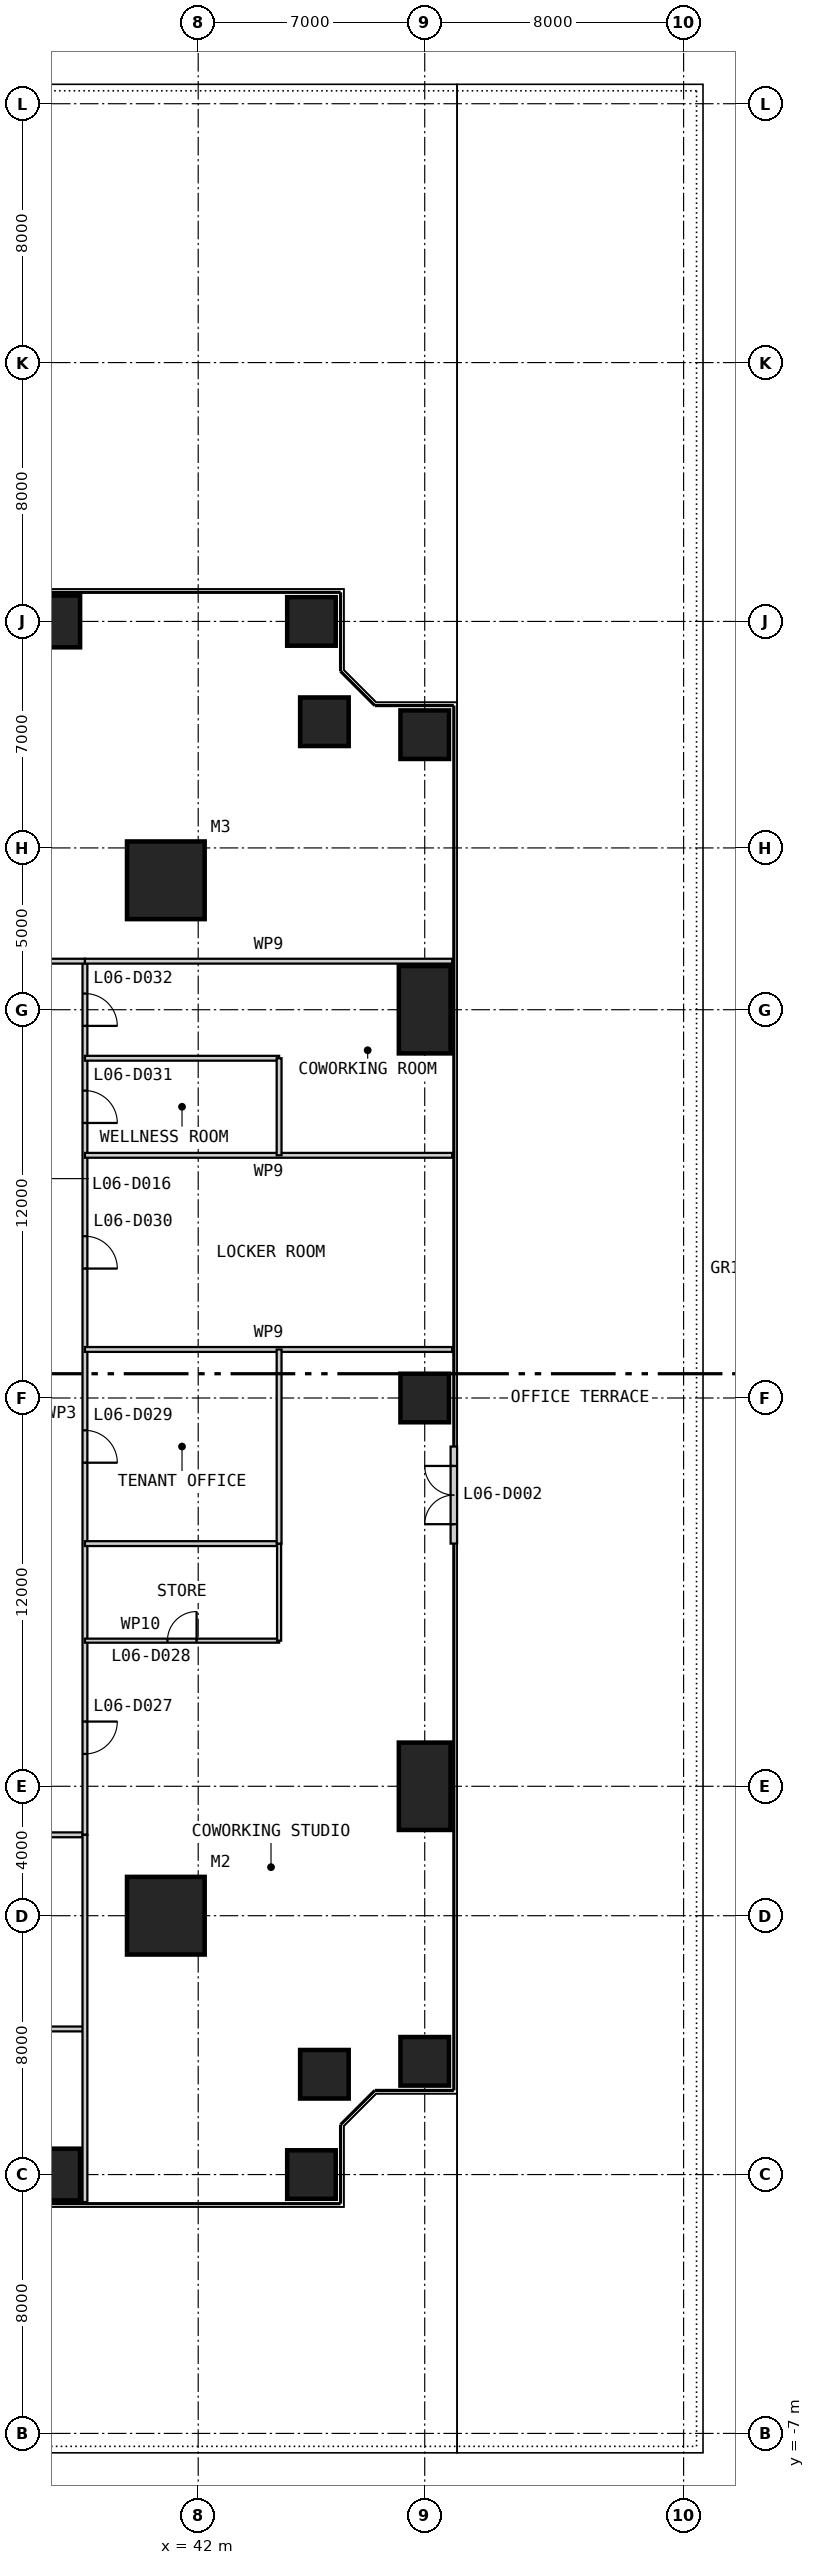
"""IFC4 building model, lengths in metres.
Left out: names, types, materials, properties, quantities, classifications, styles, units other than length and angle.
Written with IfcOpenShell. Run it as: python <this file> out.ifc"""

import sys

from ifc_helpers import new_model, si_unit, direction, frame, frame_2d, origin, origin_2d, place, context, subcontext, project, spatial, rectangle, extrude, element, fill, save


model = new_model("IFC4")
c1 = context("Model", 3, precision=1e-05, world=origin(), true_north=direction((0.0, 1.0)))
c2 = subcontext(c1, "Body", "Model", "MODEL_VIEW")
j1 = project(units=[si_unit("LENGTHUNIT", "METRE"), si_unit("PLANEANGLEUNIT", "RADIAN")], contexts=[c1])
p1 = place(None, origin())
s1 = spatial("IfcSite", under=j1, at=p1, CompositionType="ELEMENT")
p2 = place(p1, origin())
s2 = spatial("IfcBuilding", under=s1, at=p2, CompositionType="ELEMENT")
p3 = place(p2, frame((0.0, 0.0, 31.0)))
s3 = spatial("IfcBuildingStorey", under=s2, at=p3, CompositionType="ELEMENT", Elevation=31.0)
for number, where, z_axis, x_axis in (
    (1, (41.0, 9.0, 0.0), (0.0, 0.0, 1.0), (1.0, 0.0, 0.0)),
    (2, (41.0, 41.0, 0.0), (0.0, 0.0, 1.0), (1.0, 0.0, 0.0)),
):
    element("IfcColumn", number, at=place(p3, frame(where, z_axis=z_axis, x_axis=x_axis)), inside=s3, PredefinedType="COLUMN", context=c2, shape_type="SweptSolid", body=[
        extrude(rectangle(XDim=2.4, YDim=2.4, at=origin_2d()), origin(), (0.0, 0.0, 1.0), 4.0),
    ])
p4 = place(p3, frame((37.0, 1.0, 0.0), z_axis=(0.0, 0.0, 1.0), x_axis=(1.0, 0.0, 0.0)))
e3 = element("IfcColumn", 3, at=p4, inside=s3, PredefinedType="COLUMN", context=c2, shape_type="SweptSolid", body=[
    extrude(rectangle(XDim=2.7, YDim=1.6, at=origin_2d()), origin(), (0.0, 0.0, 1.0), 4.0),
])
for number, where, z_axis, x_axis in (
    (4, (45.5, 1.0, 0.0), (0.0, 0.0, 1.0), (1.0, 0.0, 0.0)),
    (5, (45.9, 4.1, 0.0), (0.0, 0.0, 1.0), (1.0, 0.0, 0.0)),
    (6, (49.0, 4.5, 0.0), (0.0, 0.0, 1.0), (1.0, 0.0, 0.0)),
):
    element("IfcColumn", number, at=place(p3, frame(where, z_axis=z_axis, x_axis=x_axis)), inside=s3, PredefinedType="COLUMN", context=c2, shape_type="SweptSolid", body=[
        extrude(rectangle(XDim=1.5, YDim=1.5, at=origin_2d()), origin(), (0.0, 0.0, 1.0), 4.0),
    ])
p5 = place(p3, frame((49.0, 13.0, 0.0), z_axis=(0.0, 0.0, 1.0), x_axis=(1.0, 0.0, 0.0)))
e7 = element("IfcColumn", 7, at=p5, inside=s3, PredefinedType="COLUMN", context=c2, shape_type="SweptSolid", body=[
    extrude(rectangle(XDim=1.6, YDim=2.7, at=origin_2d()), origin(), (0.0, 0.0, 1.0), 4.0),
])
p6 = place(p3, frame((49.0, 25.0, 0.0), z_axis=(0.0, 0.0, 1.0), x_axis=(1.0, 0.0, 0.0)))
e8 = element("IfcColumn", 8, at=p6, inside=s3, PredefinedType="COLUMN", context=c2, shape_type="SweptSolid", body=[
    extrude(rectangle(XDim=1.5, YDim=1.5, at=origin_2d()), origin(), (0.0, 0.0, 1.0), 4.0),
])
p7 = place(p3, frame((49.0, 37.0, 0.0), z_axis=(0.0, 0.0, 1.0), x_axis=(1.0, 0.0, 0.0)))
e9 = element("IfcColumn", 9, at=p7, inside=s3, PredefinedType="COLUMN", context=c2, shape_type="SweptSolid", body=[
    extrude(rectangle(XDim=1.6, YDim=2.7, at=origin_2d()), origin(), (0.0, 0.0, 1.0), 4.0),
])
for number, where, z_axis, x_axis in (
    (10, (49.0, 45.5, 0.0), (0.0, 0.0, 1.0), (1.0, 0.0, 0.0)),
    (11, (45.9, 45.9, 0.0), (0.0, 0.0, 1.0), (1.0, 0.0, 0.0)),
    (12, (45.5, 49.0, 0.0), (0.0, 0.0, 1.0), (1.0, 0.0, 0.0)),
):
    element("IfcColumn", number, at=place(p3, frame(where, z_axis=z_axis, x_axis=x_axis)), inside=s3, PredefinedType="COLUMN", context=c2, shape_type="SweptSolid", body=[
        extrude(rectangle(XDim=1.5, YDim=1.5, at=origin_2d()), origin(), (0.0, 0.0, 1.0), 4.0),
    ])
p8 = place(p3, frame((37.0, 49.0, 0.0), z_axis=(0.0, 0.0, 1.0), x_axis=(1.0, 0.0, 0.0)))
e13 = element("IfcColumn", 13, at=p8, inside=s3, PredefinedType="COLUMN", context=c2, shape_type="SweptSolid", body=[
    extrude(rectangle(XDim=2.7, YDim=1.6, at=origin_2d()), origin(), (0.0, 0.0, 1.0), 4.0),
])
p9 = place(p3, frame((49.9, 20.5, 0.0), z_axis=(0.0, 0.0, 1.0), x_axis=(0.0, 1.0, 0.0)))
e14 = element("IfcWall", 14, at=p9, inside=s3, PredefinedType="SOLIDWALL", context=c2, shape_type="SweptSolid", body=[
    extrude(rectangle(XDim=3.0, YDim=0.2, at=frame_2d((1.5, 0.0))), origin(), (0.0, 0.0, 1.0), 3.85),
])
p10 = place(p9, frame((0.6, 0.0, 0.0)))
e15 = element("IfcOpeningElement", 15, at=p10, cuts=e14, PredefinedType="OPENING", context=c2, shape_type="SweptSolid", body=[
    extrude(rectangle(XDim=1.8, YDim=2.4, at=frame_2d((0.9, 1.2))), frame((0.0, 0.11, 0.0), z_axis=(0.0, -1.0, 0.0), x_axis=(1.0, 0.0, 0.0)), (0.0, 0.0, 1.0), 0.22),
])
p11 = place(p3, frame((11.5, 11.5, 0.0), z_axis=(0.0, 0.0, 1.0), x_axis=(1.0, 0.0, 0.0)))
e16 = element("IfcWall", 16, at=p11, inside=s3, PredefinedType="PARTITIONING", context=c2, shape_type="SweptSolid", body=[
    extrude(rectangle(XDim=27.0, YDim=0.15, at=frame_2d((13.5, 0.0))), origin(), (0.0, 0.0, 1.0), 3.85),
])
p12 = place(p11, frame((5.5, 0.0, 0.0)))
e17 = element("IfcOpeningElement", 17, at=p12, cuts=e16, PredefinedType="OPENING", context=c2, shape_type="SweptSolid", body=[
    extrude(rectangle(XDim=1.0, YDim=2.2, at=frame_2d((0.5, 1.1))), frame((0.0, 0.085, 0.0), z_axis=(0.0, -1.0, 0.0), x_axis=(1.0, 0.0, 0.0)), (0.0, 0.0, 1.0), 0.17),
])
p13 = place(p11, frame((17.5, 0.0, 0.0)))
e18 = element("IfcOpeningElement", 18, at=p13, cuts=e16, PredefinedType="OPENING", context=c2, shape_type="SweptSolid", body=[
    extrude(rectangle(XDim=1.0, YDim=2.2, at=frame_2d((0.5, 1.1))), frame((0.0, 0.085, 0.0), z_axis=(0.0, -1.0, 0.0), x_axis=(1.0, 0.0, 0.0)), (0.0, 0.0, 1.0), 0.17),
])
p14 = place(p11, frame((23.5, 0.0, 0.0)))
e19 = element("IfcOpeningElement", 19, at=p14, cuts=e16, PredefinedType="OPENING", context=c2, shape_type="SweptSolid", body=[
    extrude(rectangle(XDim=1.0, YDim=2.2, at=frame_2d((0.5, 1.1))), frame((0.0, 0.085, 0.0), z_axis=(0.0, -1.0, 0.0), x_axis=(1.0, 0.0, 0.0)), (0.0, 0.0, 1.0), 0.17),
])
p15 = place(p3, frame((32.5, 5.5, 0.0), z_axis=(0.0, 0.0, 1.0), x_axis=(1.0, 0.0, 0.0)))
e20 = element("IfcWall", 20, at=p15, inside=s3, PredefinedType="PARTITIONING", context=c2, shape_type="SweptSolid", body=[
    extrude(rectangle(XDim=6.0, YDim=0.15, at=frame_2d((3.0, 0.0))), origin(), (0.0, 0.0, 1.0), 3.85),
])
p16 = place(p3, frame((38.5, 11.5, 0.0), z_axis=(0.0, 0.0, 1.0), x_axis=(0.0, 1.0, 0.0)))
e21 = element("IfcWall", 21, at=p16, inside=s3, PredefinedType="PARTITIONING", context=c2, shape_type="SweptSolid", body=[
    extrude(rectangle(XDim=27.0, YDim=0.15, at=frame_2d((13.5, 0.0))), origin(), (0.0, 0.0, 1.0), 3.85),
])
p17 = place(p16, frame((2.5, 0.0, 0.0)))
e22 = element("IfcOpeningElement", 22, at=p17, cuts=e21, PredefinedType="OPENING", context=c2, shape_type="SweptSolid", body=[
    extrude(rectangle(XDim=1.0, YDim=2.2, at=frame_2d((0.5, 1.1))), frame((0.0, 0.085, 0.0), z_axis=(0.0, -1.0, 0.0), x_axis=(1.0, 0.0, 0.0)), (0.0, 0.0, 1.0), 0.17),
])
p18 = place(p16, frame((11.5, 0.0, 0.0)))
e23 = element("IfcOpeningElement", 23, at=p18, cuts=e21, PredefinedType="OPENING", context=c2, shape_type="SweptSolid", body=[
    extrude(rectangle(XDim=1.0, YDim=2.2, at=frame_2d((0.5, 1.1))), frame((0.0, 0.085, 0.0), z_axis=(0.0, -1.0, 0.0), x_axis=(1.0, 0.0, 0.0)), (0.0, 0.0, 1.0), 0.17),
])
p19 = place(p16, frame((17.5, 0.0, 0.0)))
e24 = element("IfcOpeningElement", 24, at=p19, cuts=e21, PredefinedType="OPENING", context=c2, shape_type="SweptSolid", body=[
    extrude(rectangle(XDim=1.0, YDim=2.2, at=frame_2d((0.5, 1.1))), frame((0.0, 0.085, 0.0), z_axis=(0.0, -1.0, 0.0), x_axis=(1.0, 0.0, 0.0)), (0.0, 0.0, 1.0), 0.17),
])
p20 = place(p16, frame((22.0, 0.0, 0.0)))
e25 = element("IfcOpeningElement", 25, at=p20, cuts=e21, PredefinedType="OPENING", context=c2, shape_type="SweptSolid", body=[
    extrude(rectangle(XDim=1.0, YDim=2.2, at=frame_2d((0.5, 1.1))), frame((0.0, 0.085, 0.0), z_axis=(0.0, -1.0, 0.0), x_axis=(1.0, 0.0, 0.0)), (0.0, 0.0, 1.0), 0.17),
])
p21 = place(p16, frame((25.0, 0.0, 0.0)))
e26 = element("IfcOpeningElement", 26, at=p21, cuts=e21, PredefinedType="OPENING", context=c2, shape_type="SweptSolid", body=[
    extrude(rectangle(XDim=1.0, YDim=2.2, at=frame_2d((0.5, 1.1))), frame((0.0, 0.085, 0.0), z_axis=(0.0, -1.0, 0.0), x_axis=(1.0, 0.0, 0.0)), (0.0, 0.0, 1.0), 0.17),
])
p22 = place(p3, frame((38.5, 0.15, 0.0), z_axis=(0.0, 0.0, 1.0), x_axis=(0.0, 1.0, 0.0)))
e27 = element("IfcWall", 27, at=p22, inside=s3, PredefinedType="PARTITIONING", context=c2, shape_type="SweptSolid", body=[
    extrude(rectangle(XDim=11.35, YDim=0.15, at=frame_2d((5.675, 0.0))), origin(), (0.0, 0.0, 1.0), 3.85),
])
p23 = place(p3, frame((44.5, 17.5, 0.0), z_axis=(0.0, 0.0, 1.0), x_axis=(-1.0, 0.0, 0.0)))
e28 = element("IfcWall", 28, at=p23, inside=s3, PredefinedType="PARTITIONING", context=c2, shape_type="SweptSolid", body=[
    extrude(rectangle(XDim=6.0, YDim=0.125, at=frame_2d((3.0, 0.0))), origin(), (0.0, 0.0, 1.0), 3.85),
])
p24 = place(p23, frame((2.55, 0.0, 0.0)))
e29 = element("IfcOpeningElement", 29, at=p24, cuts=e28, PredefinedType="OPENING", context=c2, shape_type="SweptSolid", body=[
    extrude(rectangle(XDim=0.9, YDim=2.2, at=frame_2d((0.45, 1.1))), frame((0.0, 0.073, 0.0), z_axis=(0.0, -1.0, 0.0), x_axis=(1.0, 0.0, 0.0)), (0.0, 0.0, 1.0), 0.145),
])
p25 = place(p3, frame((44.5, 20.5, 0.0), z_axis=(0.0, 0.0, 1.0), x_axis=(-1.0, 0.0, 0.0)))
e30 = element("IfcWall", 30, at=p25, inside=s3, PredefinedType="PARTITIONING", context=c2, shape_type="SweptSolid", body=[
    extrude(rectangle(XDim=6.0, YDim=0.15, at=frame_2d((3.0, 0.0))), origin(), (0.0, 0.0, 1.0), 3.85),
])
for number, where, z_axis, x_axis in (
    (31, (49.85, 26.5, 0.0), (0.0, 0.0, 1.0), (-1.0, 0.0, 0.0)),
    (32, (49.85, 32.5, 0.0), (0.0, 0.0, 1.0), (-1.0, 0.0, 0.0)),
):
    element("IfcWall", number, at=place(p3, frame(where, z_axis=z_axis, x_axis=x_axis)), inside=s3, PredefinedType="PARTITIONING", context=c2, shape_type="SweptSolid", body=[
        extrude(rectangle(XDim=11.35, YDim=0.15, at=frame_2d((5.675, 0.0))), origin(), (0.0, 0.0, 1.0), 3.85),
    ])
p26 = place(p3, frame((44.5, 35.5, 0.0), z_axis=(0.0, 0.0, 1.0), x_axis=(-1.0, 0.0, 0.0)))
e33 = element("IfcWall", 33, at=p26, inside=s3, PredefinedType="PARTITIONING", context=c2, shape_type="SweptSolid", body=[
    extrude(rectangle(XDim=6.0, YDim=0.15, at=frame_2d((3.0, 0.0))), origin(), (0.0, 0.0, 1.0), 3.85),
])
p27 = place(p3, frame((44.5, 17.5, 0.0), z_axis=(0.0, 0.0, 1.0), x_axis=(0.0, 1.0, 0.0)))
e34 = element("IfcWall", 34, at=p27, inside=s3, PredefinedType="PARTITIONING", context=c2, shape_type="SweptSolid", body=[
    extrude(rectangle(XDim=3.0, YDim=0.125, at=frame_2d((1.5, 0.0))), origin(), (0.0, 0.0, 1.0), 3.85),
])
p28 = place(p3, frame((44.5, 20.5, 0.0), z_axis=(0.0, 0.0, 1.0), x_axis=(0.0, 1.0, 0.0)))
e35 = element("IfcWall", 35, at=p28, inside=s3, PredefinedType="PARTITIONING", context=c2, shape_type="SweptSolid", body=[
    extrude(rectangle(XDim=6.0, YDim=0.15, at=frame_2d((3.0, 0.0))), origin(), (0.0, 0.0, 1.0), 3.85),
])
p29 = place(p3, frame((44.5, 32.5, 0.0), z_axis=(0.0, 0.0, 1.0), x_axis=(0.0, 1.0, 0.0)))
e36 = element("IfcWall", 36, at=p29, inside=s3, PredefinedType="PARTITIONING", context=c2, shape_type="SweptSolid", body=[
    extrude(rectangle(XDim=3.0, YDim=0.15, at=frame_2d((1.5, 0.0))), origin(), (0.0, 0.0, 1.0), 3.85),
])
p30 = place(p3, frame((38.5, 38.5, 0.0), z_axis=(0.0, 0.0, 1.0), x_axis=(-1.0, 0.0, 0.0)))
e37 = element("IfcWall", 37, at=p30, inside=s3, PredefinedType="PARTITIONING", context=c2, shape_type="SweptSolid", body=[
    extrude(rectangle(XDim=27.0, YDim=0.15, at=frame_2d((13.5, 0.0))), origin(), (0.0, 0.0, 1.0), 3.85),
])
p31 = place(p30, frame((5.5, 0.0, 0.0)))
e38 = element("IfcOpeningElement", 38, at=p31, cuts=e37, PredefinedType="OPENING", context=c2, shape_type="SweptSolid", body=[
    extrude(rectangle(XDim=1.0, YDim=2.2, at=frame_2d((0.5, 1.1))), frame((0.0, 0.085, 0.0), z_axis=(0.0, -1.0, 0.0), x_axis=(1.0, 0.0, 0.0)), (0.0, 0.0, 1.0), 0.17),
])
p32 = place(p30, frame((17.5, 0.0, 0.0)))
e39 = element("IfcOpeningElement", 39, at=p32, cuts=e37, PredefinedType="OPENING", context=c2, shape_type="SweptSolid", body=[
    extrude(rectangle(XDim=1.0, YDim=2.2, at=frame_2d((0.5, 1.1))), frame((0.0, 0.085, 0.0), z_axis=(0.0, -1.0, 0.0), x_axis=(1.0, 0.0, 0.0)), (0.0, 0.0, 1.0), 0.17),
])
p33 = place(p30, frame((23.5, 0.0, 0.0)))
e40 = element("IfcOpeningElement", 40, at=p33, cuts=e37, PredefinedType="OPENING", context=c2, shape_type="SweptSolid", body=[
    extrude(rectangle(XDim=1.0, YDim=2.2, at=frame_2d((0.5, 1.1))), frame((0.0, 0.085, 0.0), z_axis=(0.0, -1.0, 0.0), x_axis=(1.0, 0.0, 0.0)), (0.0, 0.0, 1.0), 0.17),
])
p34 = place(p3, frame((49.85, 38.5, 0.0), z_axis=(0.0, 0.0, 1.0), x_axis=(-1.0, 0.0, 0.0)))
e41 = element("IfcWall", 41, at=p34, inside=s3, PredefinedType="PARTITIONING", context=c2, shape_type="SweptSolid", body=[
    extrude(rectangle(XDim=11.35, YDim=0.15, at=frame_2d((5.675, 0.0))), origin(), (0.0, 0.0, 1.0), 3.85),
])
p35 = place(p10, origin())
e42 = element("IfcDoor", 42, at=p35, inside=s3, OperationType="DOUBLE_DOOR_SINGLE_SWING", PredefinedType="DOOR", context=c2, shape_type="SweptSolid", body=[
    extrude(rectangle(XDim=1.8, YDim=2.4, at=frame_2d((0.9, 1.2))), frame((0.0, 0.025, 0.0), z_axis=(0.0, -1.0, 0.0), x_axis=(1.0, 0.0, 0.0)), (0.0, 0.0, 1.0), 0.05),
])
fill(e15, e42)
p36 = place(p17, frame((1.0, 0.0, 0.0), z_axis=(0.0, 0.0, 1.0), x_axis=(-1.0, 0.0, 0.0)))
e43 = element("IfcDoor", 43, at=p36, inside=s3, OperationType="SINGLE_SWING_LEFT", PredefinedType="DOOR", context=c2, shape_type="SweptSolid", body=[
    extrude(rectangle(XDim=1.0, YDim=2.2, at=frame_2d((0.5, 1.1))), frame((0.0, 0.025, 0.0), z_axis=(0.0, -1.0, 0.0), x_axis=(1.0, 0.0, 0.0)), (0.0, 0.0, 1.0), 0.05),
])
fill(e22, e43)
p37 = place(p24, frame((0.9, 0.0, 0.0), z_axis=(0.0, 0.0, 1.0), x_axis=(-1.0, 0.0, 0.0)))
e44 = element("IfcDoor", 44, at=p37, inside=s3, OperationType="SINGLE_SWING_RIGHT", PredefinedType="DOOR", context=c2, shape_type="SweptSolid", body=[
    extrude(rectangle(XDim=0.9, YDim=2.2, at=frame_2d((0.45, 1.1))), frame((0.0, 0.025, 0.0), z_axis=(0.0, -1.0, 0.0), x_axis=(1.0, 0.0, 0.0)), (0.0, 0.0, 1.0), 0.05),
])
fill(e29, e44)
p38 = place(p18, frame((1.0, 0.0, 0.0), z_axis=(0.0, 0.0, 1.0), x_axis=(-1.0, 0.0, 0.0)))
e45 = element("IfcDoor", 45, at=p38, inside=s3, OperationType="SINGLE_SWING_RIGHT", PredefinedType="DOOR", context=c2, shape_type="SweptSolid", body=[
    extrude(rectangle(XDim=1.0, YDim=2.2, at=frame_2d((0.5, 1.1))), frame((0.0, 0.025, 0.0), z_axis=(0.0, -1.0, 0.0), x_axis=(1.0, 0.0, 0.0)), (0.0, 0.0, 1.0), 0.05),
])
fill(e23, e45)
p39 = place(p19, frame((1.0, 0.0, 0.0), z_axis=(0.0, 0.0, 1.0), x_axis=(-1.0, 0.0, 0.0)))
e46 = element("IfcDoor", 46, at=p39, inside=s3, OperationType="SINGLE_SWING_RIGHT", PredefinedType="DOOR", context=c2, shape_type="SweptSolid", body=[
    extrude(rectangle(XDim=1.0, YDim=2.2, at=frame_2d((0.5, 1.1))), frame((0.0, 0.025, 0.0), z_axis=(0.0, -1.0, 0.0), x_axis=(1.0, 0.0, 0.0)), (0.0, 0.0, 1.0), 0.05),
])
fill(e24, e46)
p40 = place(p20, frame((1.0, 0.0, 0.0), z_axis=(0.0, 0.0, 1.0), x_axis=(-1.0, 0.0, 0.0)))
e47 = element("IfcDoor", 47, at=p40, inside=s3, OperationType="SINGLE_SWING_RIGHT", PredefinedType="DOOR", context=c2, shape_type="SweptSolid", body=[
    extrude(rectangle(XDim=1.0, YDim=2.2, at=frame_2d((0.5, 1.1))), frame((0.0, 0.025, 0.0), z_axis=(0.0, -1.0, 0.0), x_axis=(1.0, 0.0, 0.0)), (0.0, 0.0, 1.0), 0.05),
])
fill(e25, e47)
p41 = place(p21, frame((1.0, 0.0, 0.0), z_axis=(0.0, 0.0, 1.0), x_axis=(-1.0, 0.0, 0.0)))
e48 = element("IfcDoor", 48, at=p41, inside=s3, OperationType="SINGLE_SWING_RIGHT", PredefinedType="DOOR", context=c2, shape_type="SweptSolid", body=[
    extrude(rectangle(XDim=1.0, YDim=2.2, at=frame_2d((0.5, 1.1))), frame((0.0, 0.025, 0.0), z_axis=(0.0, -1.0, 0.0), x_axis=(1.0, 0.0, 0.0)), (0.0, 0.0, 1.0), 0.05),
])
fill(e26, e48)
save(model, sys.argv[1])
